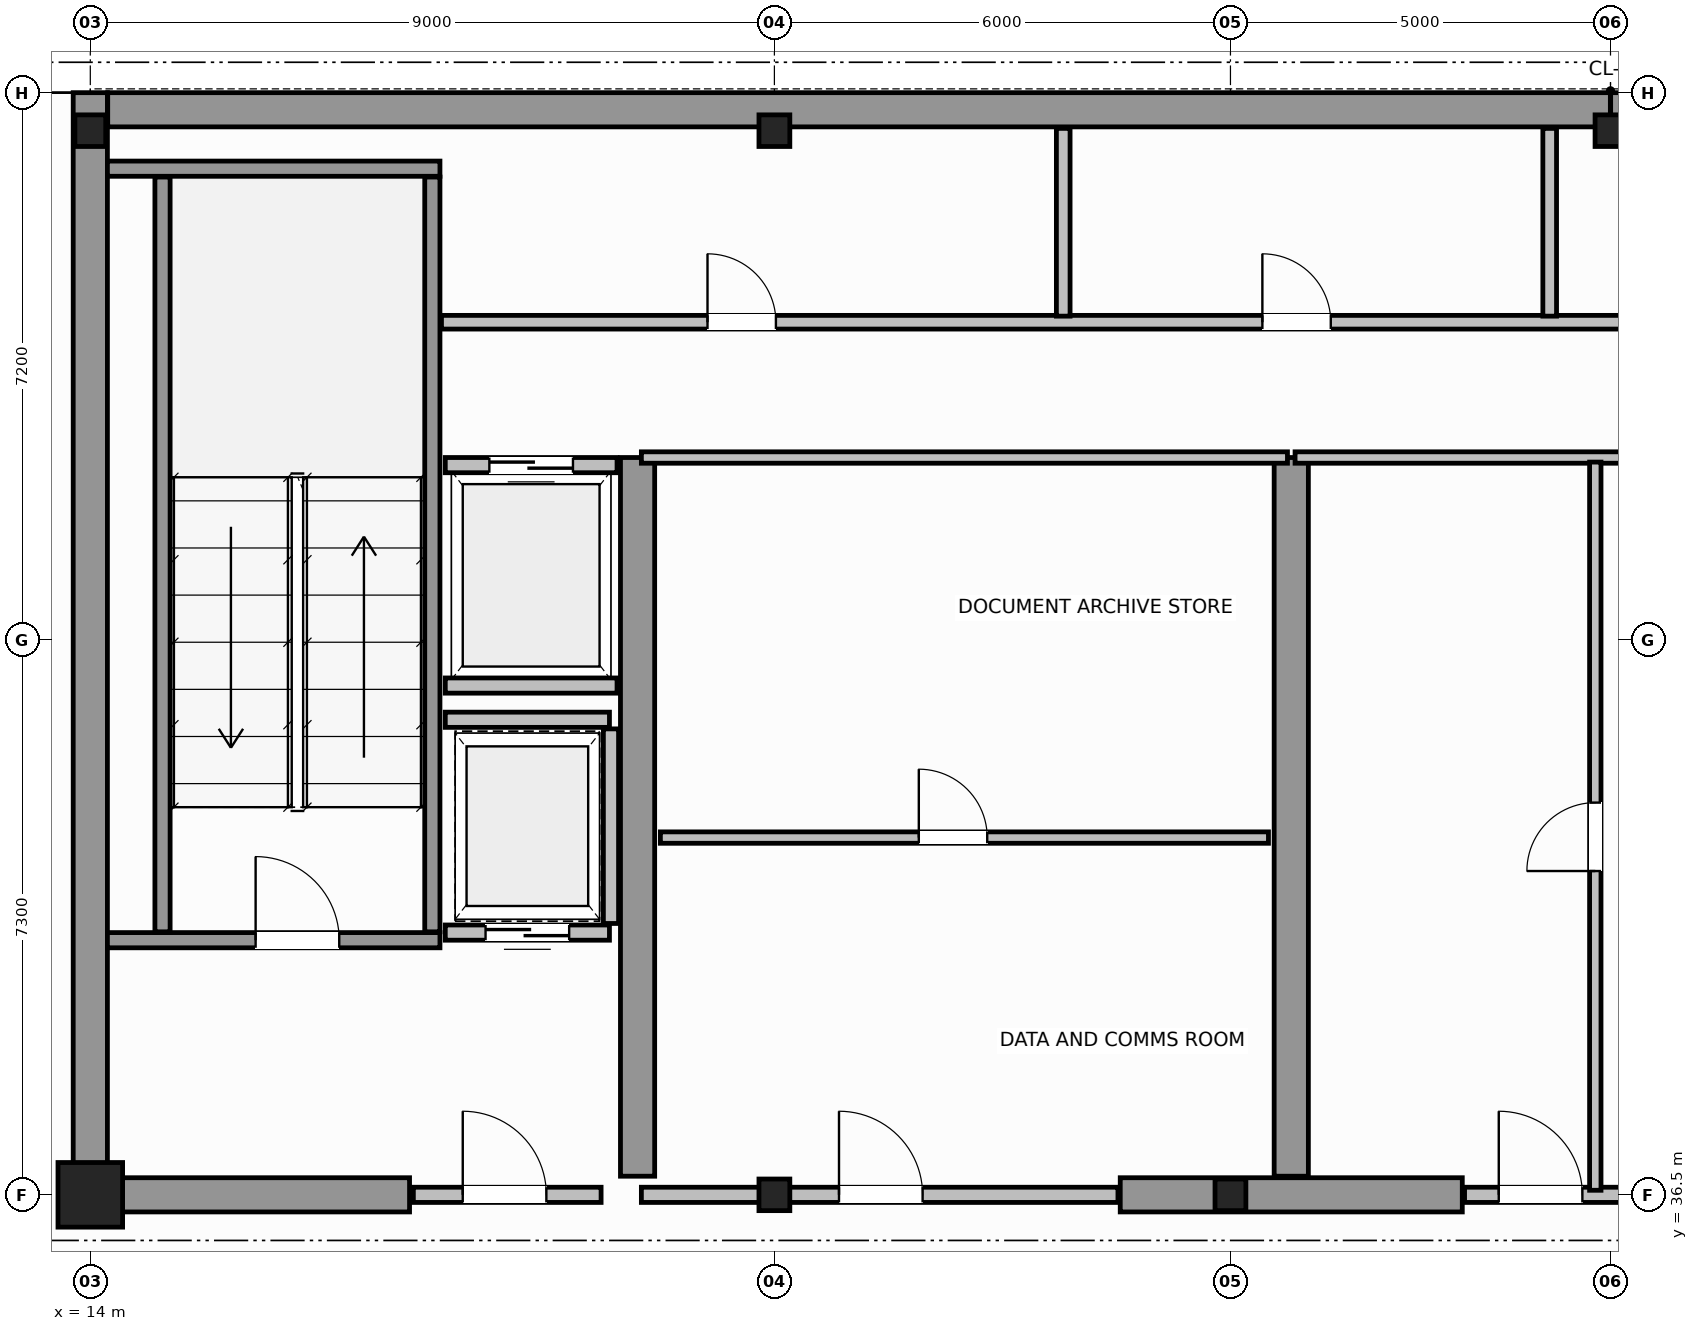
"""IFC4 building model, lengths in metres.
Left out: names, types, materials, properties, quantities, classifications, styles, units other than length and angle.
Written with IfcOpenShell. Run it as: python <this file> out.ifc"""

import sys

from ifc_helpers import new_model, si_unit, direction, frame, frame_2d, origin, origin_2d, place, context, subcontext, project, spatial, rectangle, i_section, extrude, source, transform, mapped, element, fill, save


model = new_model("IFC4")
c1 = context("Model", 3, precision=1e-05, world=origin(), true_north=direction((0.0, 1.0)))
c2 = subcontext(c1, "Body", "Model", "MODEL_VIEW")
j1 = project(units=[si_unit("LENGTHUNIT", "METRE"), si_unit("PLANEANGLEUNIT", "RADIAN")], contexts=[c1])
p1 = place(None, origin())
s1 = spatial("IfcSite", under=j1, at=p1, CompositionType="ELEMENT")
p2 = place(p1, origin())
s2 = spatial("IfcBuilding", under=s1, at=p2, CompositionType="ELEMENT")
p3 = place(p2, frame((0.0, 0.0, 303.8)))
s3 = spatial("IfcBuildingStorey", under=s2, at=p3, CompositionType="ELEMENT", Elevation=303.8)
m1 = source(origin(), c2, "Body", "SweptSolid", [
    extrude(rectangle(XDim=0.85, YDim=0.85, at=origin_2d()), origin(), (0.0, 0.0, 1.0), 4.6),
])
p4 = place(p3, frame((14.0, 36.5, 0.0), z_axis=(0.0, 0.0, 1.0), x_axis=(1.0, 0.0, 0.0)))
e1 = element("IfcColumn", 1, at=p4, inside=s3, PredefinedType="COLUMN", context=c2, shape_type="MappedRepresentation", body=[
    mapped(m1, transform((0.0, 0.0, 0.0), scale=1.0)),
])
m2 = source(origin(), c2, "Body", "SweptSolid", [
    extrude(i_section(OverallWidth=0.406, OverallDepth=0.416, WebThickness=0.03, FlangeThickness=0.042, FilletRadius=0.015, at=origin_2d()), origin(), (0.0, 0.0, 1.0), 4.6),
])
for number, where, z_axis, x_axis in (
    (2, (23.0, 36.5, 0.0), (0.0, 0.0, 1.0), (1.0, 0.0, 0.0)),
    (3, (29.0, 36.5, 0.0), (0.0, 0.0, 1.0), (1.0, 0.0, 0.0)),
    (4, (14.0, 50.5, 0.0), (0.0, 0.0, 1.0), (1.0, 0.0, 0.0)),
    (5, (23.0, 50.5, 0.0), (0.0, 0.0, 1.0), (1.0, 0.0, 0.0)),
    (6, (34.0, 50.5, 0.0), (0.0, 0.0, 1.0), (1.0, 0.0, 0.0)),
):
    element("IfcColumn", number, at=place(p3, frame(where, z_axis=z_axis, x_axis=x_axis)), inside=s3, PredefinedType="COLUMN", context=c2, shape_type="MappedRepresentation", body=[
        mapped(m2, transform((0.0, 0.0, 0.0), scale=1.0)),
    ])
for number, where, z_axis, x_axis in (
    (7, (14.229, 50.775, 0.0), (0.0, 0.0, 1.0), (1.0, 0.0, 0.0)),
    (8, (34.002, 50.775, 0.0), (0.0, 0.0, 1.0), (1.0, 0.0, 0.0)),
):
    element("IfcWall", number, at=place(p3, frame(where, z_axis=z_axis, x_axis=x_axis)), inside=s3, PredefinedType="SHEAR", context=c2, shape_type="SweptSolid", body=[
        extrude(rectangle(XDim=19.769, YDim=0.45, at=frame_2d((9.885, 0.0))), origin(), (0.0, 0.0, 1.0), 4.6),
    ])
p5 = place(p3, frame((14.0, 36.5, 0.0), z_axis=(0.0, 0.0, 1.0), x_axis=(0.0, 1.0, 0.0)))
e9 = element("IfcWall", 9, at=p5, inside=s3, PredefinedType="SHEAR", context=c2, shape_type="SweptSolid", body=[
    extrude(rectangle(XDim=14.5, YDim=0.45, at=frame_2d((7.25, 0.0))), origin(), (0.0, 0.0, 1.0), 4.6),
])
p6 = place(p3, frame((14.245, 36.5, 0.0), z_axis=(0.0, 0.0, 1.0), x_axis=(1.0, 0.0, 0.0)))
e10 = element("IfcWall", 10, at=p6, inside=s3, PredefinedType="SHEAR", context=c2, shape_type="SweptSolid", body=[
    extrude(rectangle(XDim=3.955, YDim=0.45, at=frame_2d((1.978, 0.0))), origin(), (0.0, 0.0, 1.0), 3.3),
])
p7 = place(p3, frame((27.55, 36.5, 0.0), z_axis=(0.0, 0.0, 1.0), x_axis=(1.0, 0.0, 0.0)))
e11 = element("IfcWall", 11, at=p7, inside=s3, PredefinedType="SHEAR", context=c2, shape_type="SweptSolid", body=[
    extrude(rectangle(XDim=4.5, YDim=0.45, at=frame_2d((2.25, 0.0))), origin(), (0.0, 0.0, 1.0), 4.6),
])
for number, where, z_axis, x_axis in (
    (12, (21.2, 36.745, 0.0), (0.0, 0.0, 1.0), (0.0, 1.0, 0.0)),
    (13, (29.8, 36.745, 0.0), (0.0, 0.0, 1.0), (0.0, 1.0, 0.0)),
):
    element("IfcWall", number, at=place(p3, frame(where, z_axis=z_axis, x_axis=x_axis)), inside=s3, PredefinedType="SHEAR", context=c2, shape_type="SweptSolid", body=[
        extrude(rectangle(XDim=9.455, YDim=0.45, at=frame_2d((4.728, 0.0))), origin(), (0.0, 0.0, 1.0), 4.6),
    ])
p8 = place(p3, frame((14.225, 39.85, 0.0), z_axis=(0.0, 0.0, 1.0), x_axis=(1.0, 0.0, 0.0)))
e14 = element("IfcWall", 14, at=p8, inside=s3, PredefinedType="SOLIDWALL", context=c2, shape_type="SweptSolid", body=[
    extrude(rectangle(XDim=4.375, YDim=0.2, at=frame_2d((2.188, 0.0))), origin(), (0.0, 0.0, 1.0), 4.6),
])
p9 = place(p8, frame((1.95, 0.0, 0.0)))
e15 = element("IfcOpeningElement", 15, at=p9, cuts=e14, PredefinedType="OPENING", context=c2, shape_type="SweptSolid", body=[
    extrude(rectangle(XDim=1.1, YDim=2.15, at=frame_2d((0.55, 1.075))), frame((0.0, 0.11, 0.0), z_axis=(0.0, -1.0, 0.0), x_axis=(1.0, 0.0, 0.0)), (0.0, 0.0, 1.0), 0.22),
])
p10 = place(p3, frame((14.225, 50.0, 0.0), z_axis=(0.0, 0.0, 1.0), x_axis=(1.0, 0.0, 0.0)))
e16 = element("IfcWall", 16, at=p10, inside=s3, PredefinedType="SOLIDWALL", context=c2, shape_type="SweptSolid", body=[
    extrude(rectangle(XDim=4.375, YDim=0.2, at=frame_2d((2.188, 0.0))), origin(), (0.0, 0.0, 1.0), 4.6),
])
for number, where, z_axis, x_axis in (
    (17, (14.95, 39.96, 0.0), (0.0, 0.0, 1.0), (0.0, 1.0, 0.0)),
    (18, (18.5, 39.96, 0.0), (0.0, 0.0, 1.0), (0.0, 1.0, 0.0)),
):
    element("IfcWall", number, at=place(p3, frame(where, z_axis=z_axis, x_axis=x_axis)), inside=s3, PredefinedType="SOLIDWALL", context=c2, shape_type="SweptSolid", body=[
        extrude(rectangle(XDim=9.93, YDim=0.2, at=frame_2d((4.965, 0.0))), origin(), (0.0, 0.0, 1.0), 4.6),
    ])
p11 = place(p3, frame((18.25, 36.5, 0.0), z_axis=(0.0, 0.0, 1.0), x_axis=(1.0, 0.0, 0.0)))
e19 = element("IfcWall", 19, at=p11, inside=s3, PredefinedType="SOLIDWALL", context=c2, shape_type="SweptSolid", body=[
    extrude(rectangle(XDim=2.47, YDim=0.2, at=frame_2d((1.235, 0.0))), origin(), (0.0, 0.0, 1.0), 3.29),
])
p12 = place(p11, frame((0.65, 0.0, 0.0)))
e20 = element("IfcOpeningElement", 20, at=p12, cuts=e19, PredefinedType="OPENING", context=c2, shape_type="SweptSolid", body=[
    extrude(rectangle(XDim=1.1, YDim=2.15, at=frame_2d((0.55, 1.075))), frame((0.0, 0.11, 0.0), z_axis=(0.0, -1.0, 0.0), x_axis=(1.0, 0.0, 0.0)), (0.0, 0.0, 1.0), 0.22),
])
p13 = place(p3, frame((18.67, 46.1, 0.0), z_axis=(0.0, 0.0, 1.0), x_axis=(1.0, 0.0, 0.0)))
e21 = element("IfcWall", 21, at=p13, inside=s3, PredefinedType="SOLIDWALL", context=c2, shape_type="SweptSolid", body=[
    extrude(rectangle(XDim=2.26, YDim=0.2, at=frame_2d((1.13, 0.0))), origin(), (0.0, 0.0, 1.0), 4.3),
])
p14 = place(p13, frame((0.58, 0.0, 0.0)))
e22 = element("IfcOpeningElement", 22, at=p14, cuts=e21, PredefinedType="OPENING", context=c2, shape_type="SweptSolid", body=[
    extrude(rectangle(XDim=1.1, YDim=2.15, at=frame_2d((0.55, 1.075))), frame((0.0, 0.11, 0.0), z_axis=(0.0, -1.0, 0.0), x_axis=(1.0, 0.0, 0.0)), (0.0, 0.0, 1.0), 0.22),
])
p15 = place(p3, frame((18.67, 43.2, 0.0), z_axis=(0.0, 0.0, 1.0), x_axis=(1.0, 0.0, 0.0)))
e23 = element("IfcWall", 23, at=p15, inside=s3, PredefinedType="SOLIDWALL", context=c2, shape_type="SweptSolid", body=[
    extrude(rectangle(XDim=2.26, YDim=0.2, at=frame_2d((1.13, 0.0))), origin(), (0.0, 0.0, 1.0), 4.3),
])
p16 = place(p3, frame((18.67, 39.95, 0.0), z_axis=(0.0, 0.0, 1.0), x_axis=(1.0, 0.0, 0.0)))
e24 = element("IfcWall", 24, at=p16, inside=s3, PredefinedType="SOLIDWALL", context=c2, shape_type="SweptSolid", body=[
    extrude(rectangle(XDim=2.16, YDim=0.2, at=frame_2d((1.08, 0.0))), origin(), (0.0, 0.0, 1.0), 4.3),
])
p17 = place(p16, frame((0.53, 0.0, 0.0)))
e25 = element("IfcOpeningElement", 25, at=p17, cuts=e24, PredefinedType="OPENING", context=c2, shape_type="SweptSolid", body=[
    extrude(rectangle(XDim=1.1, YDim=2.15, at=frame_2d((0.55, 1.075))), frame((0.0, 0.11, 0.0), z_axis=(0.0, -1.0, 0.0), x_axis=(1.0, 0.0, 0.0)), (0.0, 0.0, 1.0), 0.22),
])
p18 = place(p3, frame((18.67, 42.75, 0.0), z_axis=(0.0, 0.0, 1.0), x_axis=(1.0, 0.0, 0.0)))
e26 = element("IfcWall", 26, at=p18, inside=s3, PredefinedType="SOLIDWALL", context=c2, shape_type="SweptSolid", body=[
    extrude(rectangle(XDim=2.16, YDim=0.2, at=frame_2d((1.08, 0.0))), origin(), (0.0, 0.0, 1.0), 4.3),
])
p19 = place(p3, frame((20.85, 40.07, 0.0), z_axis=(0.0, 0.0, 1.0), x_axis=(0.0, 1.0, 0.0)))
e27 = element("IfcWall", 27, at=p19, inside=s3, PredefinedType="SOLIDWALL", context=c2, shape_type="SweptSolid", body=[
    extrude(rectangle(XDim=2.56, YDim=0.2, at=frame_2d((1.28, 0.0))), origin(), (0.0, 0.0, 1.0), 4.3),
])
p20 = place(p3, frame((21.25, 36.5, 0.0), z_axis=(0.0, 0.0, 1.0), x_axis=(1.0, 0.0, 0.0)))
e28 = element("IfcWall", 28, at=p20, inside=s3, PredefinedType="SOLIDWALL", context=c2, shape_type="SweptSolid", body=[
    extrude(rectangle(XDim=6.27, YDim=0.2, at=frame_2d((3.135, 0.0))), origin(), (0.0, 0.0, 1.0), 3.09),
])
p21 = place(p20, frame((2.6, 0.0, 0.0)))
e29 = element("IfcOpeningElement", 29, at=p21, cuts=e28, PredefinedType="OPENING", context=c2, shape_type="SweptSolid", body=[
    extrude(rectangle(XDim=1.1, YDim=2.15, at=frame_2d((0.55, 1.075))), frame((0.0, 0.11, 0.0), z_axis=(0.0, -1.0, 0.0), x_axis=(1.0, 0.0, 0.0)), (0.0, 0.0, 1.0), 0.22),
])
p22 = place(p3, frame((21.25, 46.2, 0.0), z_axis=(0.0, 0.0, 1.0), x_axis=(1.0, 0.0, 0.0)))
e30 = element("IfcWall", 30, at=p22, inside=s3, PredefinedType="PARTITIONING", context=c2, shape_type="SweptSolid", body=[
    extrude(rectangle(XDim=8.5, YDim=0.15, at=frame_2d((4.25, 0.0))), origin(), (0.0, 0.0, 1.0), 4.3),
])
p23 = place(p3, frame((21.5, 41.2, 0.0), z_axis=(0.0, 0.0, 1.0), x_axis=(1.0, 0.0, 0.0)))
e31 = element("IfcWall", 31, at=p23, inside=s3, PredefinedType="PARTITIONING", context=c2, shape_type="SweptSolid", body=[
    extrude(rectangle(XDim=8.0, YDim=0.15, at=frame_2d((4.0, 0.0))), origin(), (0.0, 0.0, 1.0), 4.3),
])
p24 = place(p23, frame((3.4, 0.0, 0.0)))
e32 = element("IfcOpeningElement", 32, at=p24, cuts=e31, PredefinedType="OPENING", context=c2, shape_type="SweptSolid", body=[
    extrude(rectangle(XDim=0.9, YDim=2.1, at=frame_2d((0.45, 1.05))), frame((0.0, 0.085, 0.0), z_axis=(0.0, -1.0, 0.0), x_axis=(1.0, 0.0, 0.0)), (0.0, 0.0, 1.0), 0.17),
])
p25 = place(p3, frame((32.08, 36.5, 0.0), z_axis=(0.0, 0.0, 1.0), x_axis=(1.0, 0.0, 0.0)))
e33 = element("IfcWall", 33, at=p25, inside=s3, PredefinedType="SOLIDWALL", context=c2, shape_type="SweptSolid", body=[
    extrude(rectangle(XDim=4.04, YDim=0.2, at=frame_2d((2.02, 0.0))), origin(), (0.0, 0.0, 1.0), 3.09),
])
p26 = place(p25, frame((0.45, 0.0, 0.0)))
e34 = element("IfcOpeningElement", 34, at=p26, cuts=e33, PredefinedType="OPENING", context=c2, shape_type="SweptSolid", body=[
    extrude(rectangle(XDim=1.1, YDim=2.15, at=frame_2d((0.55, 1.075))), frame((0.0, 0.11, 0.0), z_axis=(0.0, -1.0, 0.0), x_axis=(1.0, 0.0, 0.0)), (0.0, 0.0, 1.0), 0.22),
])
p27 = place(p3, frame((29.85, 46.2, 0.0), z_axis=(0.0, 0.0, 1.0), x_axis=(1.0, 0.0, 0.0)))
e35 = element("IfcWall", 35, at=p27, inside=s3, PredefinedType="PARTITIONING", context=c2, shape_type="SweptSolid", body=[
    extrude(rectangle(XDim=8.5, YDim=0.15, at=frame_2d((4.25, 0.0))), origin(), (0.0, 0.0, 1.0), 4.3),
])
p28 = place(p3, frame((33.8, 36.56, 0.0), z_axis=(0.0, 0.0, 1.0), x_axis=(0.0, 1.0, 0.0)))
e36 = element("IfcWall", 36, at=p28, inside=s3, PredefinedType="PARTITIONING", context=c2, shape_type="SweptSolid", body=[
    extrude(rectangle(XDim=9.58, YDim=0.15, at=frame_2d((4.79, 0.0))), origin(), (0.0, 0.0, 1.0), 4.3),
])
p29 = place(p28, frame((4.2, 0.0, 0.0)))
e37 = element("IfcOpeningElement", 37, at=p29, cuts=e36, PredefinedType="OPENING", context=c2, shape_type="SweptSolid", body=[
    extrude(rectangle(XDim=0.9, YDim=2.1, at=frame_2d((0.45, 1.05))), frame((0.0, 0.085, 0.0), z_axis=(0.0, -1.0, 0.0), x_axis=(1.0, 0.0, 0.0)), (0.0, 0.0, 1.0), 0.17),
])
p30 = place(p3, frame((18.62, 47.98, 0.0), z_axis=(0.0, 0.0, 1.0), x_axis=(1.0, 0.0, 0.0)))
e38 = element("IfcWall", 38, at=p30, inside=s3, PredefinedType="PLUMBINGWALL", context=c2, shape_type="SweptSolid", body=[
    extrude(rectangle(XDim=20.06, YDim=0.18, at=frame_2d((10.03, 0.0))), origin(), (0.0, 0.0, 1.0), 4.3),
])
p31 = place(p30, frame((3.5, 0.0, 0.0)))
e39 = element("IfcOpeningElement", 39, at=p31, cuts=e38, PredefinedType="OPENING", context=c2, shape_type="SweptSolid", body=[
    extrude(rectangle(XDim=0.9, YDim=2.15, at=frame_2d((0.45, 1.075))), frame((0.0, 0.1, 0.0), z_axis=(0.0, -1.0, 0.0), x_axis=(1.0, 0.0, 0.0)), (0.0, 0.0, 1.0), 0.2),
])
p32 = place(p30, frame((10.8, 0.0, 0.0)))
e40 = element("IfcOpeningElement", 40, at=p32, cuts=e38, PredefinedType="OPENING", context=c2, shape_type="SweptSolid", body=[
    extrude(rectangle(XDim=0.9, YDim=2.15, at=frame_2d((0.45, 1.075))), frame((0.0, 0.1, 0.0), z_axis=(0.0, -1.0, 0.0), x_axis=(1.0, 0.0, 0.0)), (0.0, 0.0, 1.0), 0.2),
])
p33 = place(p30, frame((16.8, 0.0, 0.0)))
e41 = element("IfcOpeningElement", 41, at=p33, cuts=e38, PredefinedType="OPENING", context=c2, shape_type="SweptSolid", body=[
    extrude(rectangle(XDim=0.9, YDim=2.15, at=frame_2d((0.45, 1.075))), frame((0.0, 0.1, 0.0), z_axis=(0.0, -1.0, 0.0), x_axis=(1.0, 0.0, 0.0)), (0.0, 0.0, 1.0), 0.2),
])
for number, where, z_axis, x_axis in (
    (42, (26.8, 48.06, 0.0), (0.0, 0.0, 1.0), (0.0, 1.0, 0.0)),
    (43, (33.2, 48.06, 0.0), (0.0, 0.0, 1.0), (0.0, 1.0, 0.0)),
):
    element("IfcWall", number, at=place(p3, frame(where, z_axis=z_axis, x_axis=x_axis)), inside=s3, PredefinedType="PLUMBINGWALL", context=c2, shape_type="SweptSolid", body=[
        extrude(rectangle(XDim=2.47, YDim=0.18, at=frame_2d((1.235, 0.0))), origin(), (0.0, 0.0, 1.0), 4.3),
    ])
m3 = source(origin(), c2, "Body", "SweptSolid", [
    extrude(rectangle(XDim=1.1, YDim=2.15, at=frame_2d((0.55, 1.075))), frame((0.0, 0.025, 0.0), z_axis=(0.0, -1.0, 0.0), x_axis=(1.0, 0.0, 0.0)), (0.0, 0.0, 1.0), 0.05),
])
p34 = place(p9, origin())
e44 = element("IfcDoor", 44, at=p34, inside=s3, OperationType="SINGLE_SWING_LEFT", PredefinedType="DOOR", context=c2, shape_type="MappedRepresentation", body=[
    mapped(m3, transform((0.0, 0.0, 0.0), scale=1.0)),
])
fill(e15, e44)
p35 = place(p12, origin())
e45 = element("IfcDoor", 45, at=p35, inside=s3, OperationType="SINGLE_SWING_RIGHT", PredefinedType="DOOR", context=c2, shape_type="MappedRepresentation", body=[
    mapped(m3, transform((0.0, 0.0, 0.0), scale=1.0)),
])
fill(e20, e45)
p36 = place(p14, origin())
e46 = element("IfcDoor", 46, at=p36, inside=s3, OperationType="DOUBLE_DOOR_SLIDING", PredefinedType="DOOR", context=c2, shape_type="MappedRepresentation", body=[
    mapped(m3, transform((0.0, 0.0, 0.0), scale=1.0)),
])
fill(e22, e46)
p37 = place(p17, origin())
e47 = element("IfcDoor", 47, at=p37, inside=s3, OperationType="DOUBLE_DOOR_SLIDING", PredefinedType="DOOR", context=c2, shape_type="MappedRepresentation", body=[
    mapped(m3, transform((0.0, 0.0, 0.0), scale=1.0)),
])
fill(e25, e47)
p38 = place(p21, origin())
e48 = element("IfcDoor", 48, at=p38, inside=s3, OperationType="SINGLE_SWING_LEFT", PredefinedType="DOOR", context=c2, shape_type="MappedRepresentation", body=[
    mapped(m3, transform((0.0, 0.0, 0.0), scale=1.0)),
])
fill(e29, e48)
m4 = source(origin(), c2, "Body", "SweptSolid", [
    extrude(rectangle(XDim=0.9, YDim=2.1, at=frame_2d((0.45, 1.05))), frame((0.0, 0.025, 0.0), z_axis=(0.0, -1.0, 0.0), x_axis=(1.0, 0.0, 0.0)), (0.0, 0.0, 1.0), 0.05),
])
p39 = place(p24, origin())
e49 = element("IfcDoor", 49, at=p39, inside=s3, OperationType="SINGLE_SWING_RIGHT", PredefinedType="DOOR", context=c2, shape_type="MappedRepresentation", body=[
    mapped(m4, transform((0.0, 0.0, 0.0), scale=1.0)),
])
fill(e32, e49)
p40 = place(p26, origin())
e50 = element("IfcDoor", 50, at=p40, inside=s3, OperationType="SINGLE_SWING_LEFT", PredefinedType="DOOR", context=c2, shape_type="MappedRepresentation", body=[
    mapped(m3, transform((0.0, 0.0, 0.0), scale=1.0)),
])
fill(e34, e50)
p41 = place(p29, origin())
e51 = element("IfcDoor", 51, at=p41, inside=s3, OperationType="SINGLE_SWING_RIGHT", PredefinedType="DOOR", context=c2, shape_type="MappedRepresentation", body=[
    mapped(m4, transform((0.0, 0.0, 0.0), scale=1.0)),
])
fill(e37, e51)
m5 = source(origin(), c2, "Body", "SweptSolid", [
    extrude(rectangle(XDim=0.9, YDim=2.15, at=frame_2d((0.45, 1.075))), frame((0.0, 0.025, 0.0), z_axis=(0.0, -1.0, 0.0), x_axis=(1.0, 0.0, 0.0)), (0.0, 0.0, 1.0), 0.05),
])
p42 = place(p31, origin())
e52 = element("IfcDoor", 52, at=p42, inside=s3, OperationType="SINGLE_SWING_LEFT", PredefinedType="DOOR", context=c2, shape_type="MappedRepresentation", body=[
    mapped(m5, transform((0.0, 0.0, 0.0), scale=1.0)),
])
fill(e39, e52)
p43 = place(p32, origin())
e53 = element("IfcDoor", 53, at=p43, inside=s3, OperationType="SINGLE_SWING_RIGHT", PredefinedType="DOOR", context=c2, shape_type="MappedRepresentation", body=[
    mapped(m5, transform((0.0, 0.0, 0.0), scale=1.0)),
])
fill(e40, e53)
save(model, sys.argv[1])
